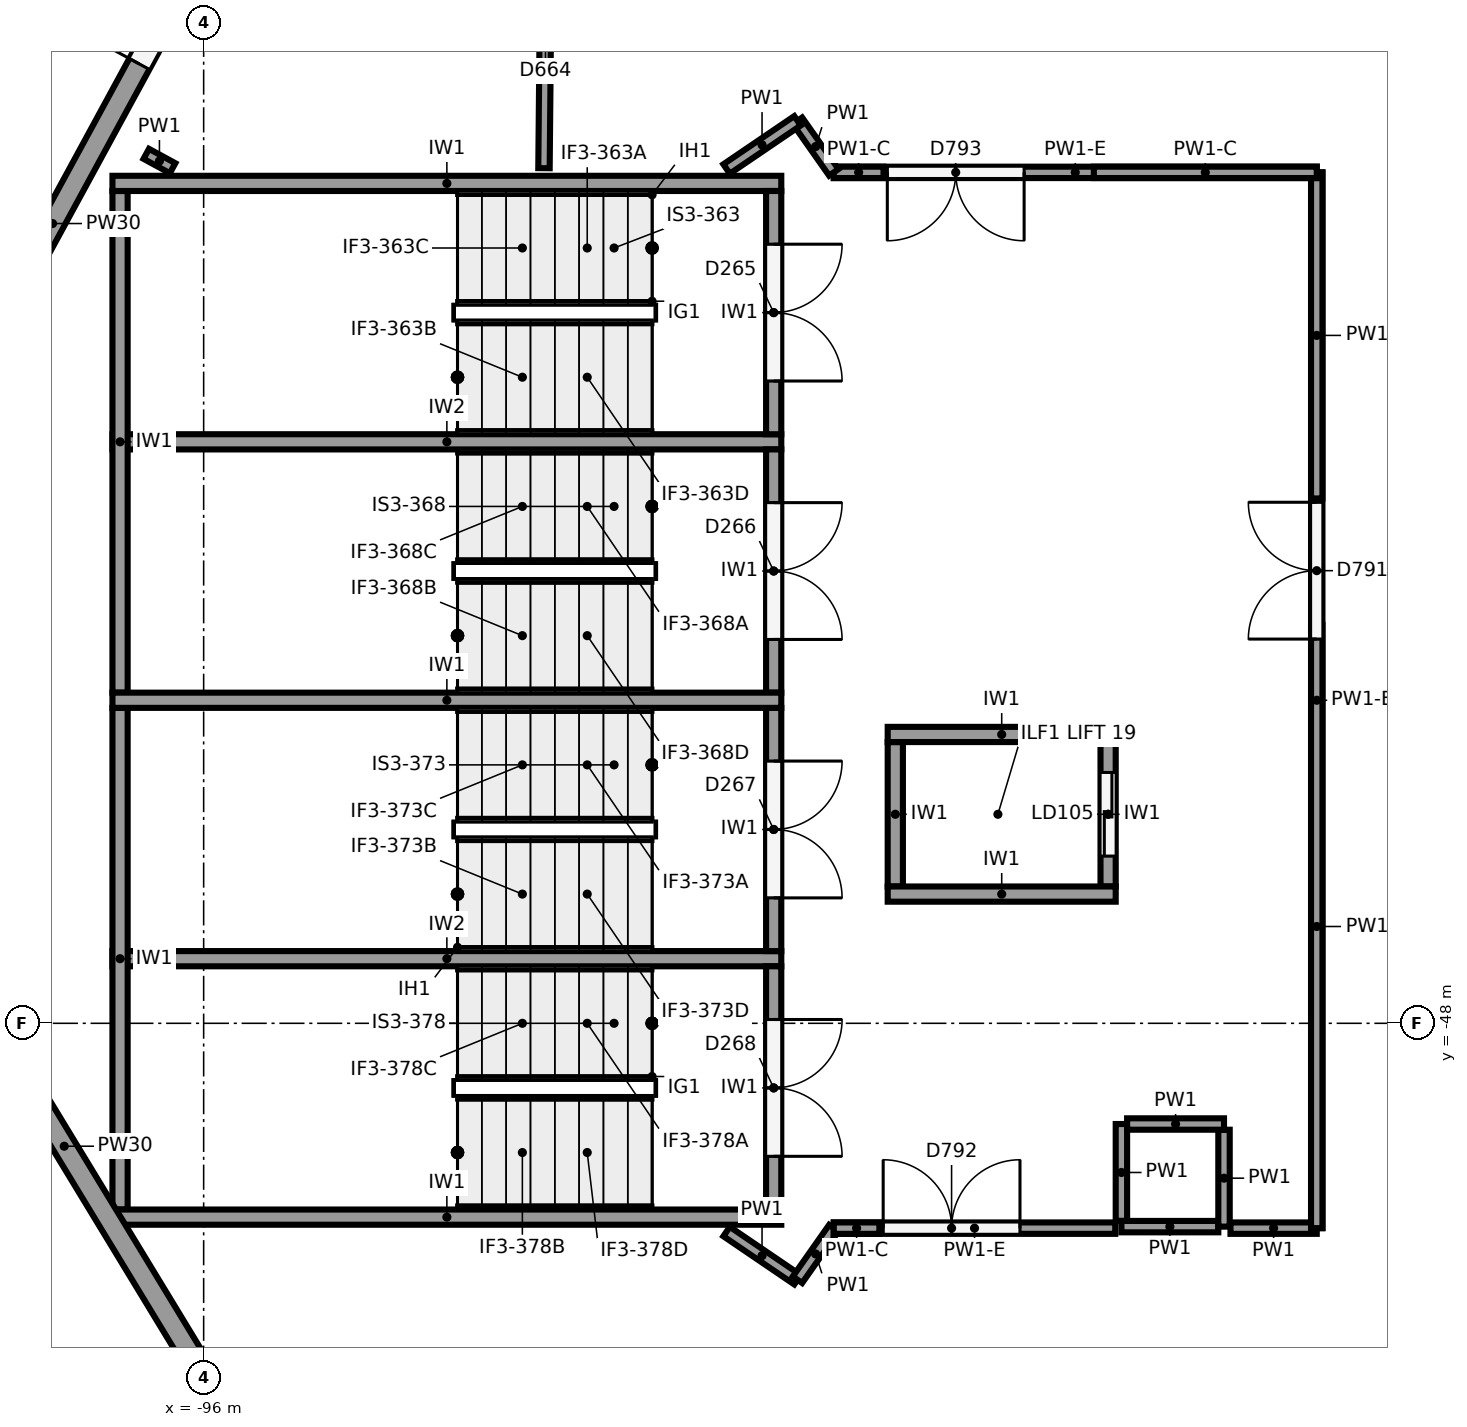
"""IFC4 building model, lengths in metres.
Left out: names, types, materials, properties, quantities, classifications, styles, units other than length and angle.
Written with IfcOpenShell. Run it as: python <this file> out.ifc"""

import sys

from ifc_helpers import new_model, si_unit, direction, frame, frame_2d, origin, origin_2d, place, context, subcontext, project, spatial, rectangle, circle, extrude, element, fill, save


model = new_model("IFC4")
c1 = context("Model", 3, precision=1e-05, world=origin(), true_north=direction((0.0, 1.0)))
c2 = subcontext(c1, "Body", "Model", "MODEL_VIEW")
j1 = project(units=[si_unit("LENGTHUNIT", "METRE"), si_unit("PLANEANGLEUNIT", "RADIAN")], contexts=[c1])
p1 = place(None, origin())
s1 = spatial("IfcSite", under=j1, at=p1, CompositionType="ELEMENT")
p2 = place(p1, origin())
s2 = spatial("IfcBuilding", under=s1, at=p2, CompositionType="ELEMENT")
p3 = place(p2, frame((0.0, 0.0, 6.5)))
s3 = spatial("IfcBuildingStorey", under=s2, at=p3, CompositionType="ELEMENT", Elevation=6.5)
p4 = place(p3, frame((-84.884, -42.562, 0.0), z_axis=(0.0, 0.0, 1.0), x_axis=(1.0, 0.0, 0.0)))
e1 = element("IfcColumn", 1, at=p4, inside=s3, PredefinedType="COLUMN", context=c2, shape_type="SweptSolid", body=[
    extrude(circle(Radius=0.6, at=origin_2d()), origin(), (0.0, 0.0, 1.0), 5.5),
])
p5 = place(p3, frame((-101.161, -43.311, 0.0), z_axis=(0.0, 0.0, 1.0), x_axis=(0.477867771117, 0.878431780691, 0.0)))
e2 = element("IfcWall", 2, at=p5, inside=s3, PredefinedType="SOLIDWALL", context=c2, shape_type="SweptSolid", body=[
    extrude(rectangle(XDim=13.28, YDim=0.3, at=frame_2d((6.64, 0.0))), origin(), (0.0, 0.0, 1.0), 3.85),
])
p6 = place(p5, frame((9.03, 0.0, 0.0)))
e3 = element("IfcOpeningElement", 3, at=p6, cuts=e2, PredefinedType="OPENING", context=c2, shape_type="SweptSolid", body=[
    extrude(rectangle(XDim=1.8, YDim=2.4, at=frame_2d((0.9, 1.2))), frame((0.0, 0.16, 0.0), z_axis=(0.0, -1.0, 0.0), x_axis=(1.0, 0.0, 0.0)), (0.0, 0.0, 1.0), 0.32),
])
p7 = place(p3, frame((-94.528, -55.057, 0.0), z_axis=(0.0, 0.0, 1.0), x_axis=(-0.519362860044, 0.854553813172, 0.0)))
e4 = element("IfcWall", 4, at=p7, inside=s3, PredefinedType="SOLIDWALL", context=c2, shape_type="SweptSolid", body=[
    extrude(rectangle(XDim=12.732, YDim=0.3, at=frame_2d((6.366, 0.0))), origin(), (0.0, 0.0, 1.0), 3.85),
])
for number, where, z_axis, x_axis in (
    (5, (-97.2, -36.95, 0.0), (0.0, 0.0, 1.0), (1.0, 0.0, 0.0)),
    (6, (-97.2, -43.75, 0.0), (0.0, 0.0, 1.0), (1.0, 0.0, 0.0)),
    (7, (-97.2, -50.55, 0.0), (0.0, 0.0, 1.0), (1.0, 0.0, 0.0)),
):
    element("IfcWall", number, at=place(p3, frame(where, z_axis=z_axis, x_axis=x_axis)), inside=s3, PredefinedType="SHEAR", context=c2, shape_type="SweptSolid", body=[
        extrude(rectangle(XDim=8.8, YDim=0.2, at=frame_2d((4.4, 0.0))), origin(), (0.0, 0.0, 1.0), 5.15),
    ])
for number, where, z_axis, x_axis in (
    (8, (-97.1, -37.05, 0.0), (0.0, 0.0, 1.0), (0.0, -1.0, 0.0)),
    (9, (-97.1, -43.85, 0.0), (0.0, 0.0, 1.0), (0.0, -1.0, 0.0)),
):
    element("IfcWall", number, at=place(p3, frame(where, z_axis=z_axis, x_axis=x_axis)), inside=s3, PredefinedType="SHEAR", context=c2, shape_type="SweptSolid", body=[
        extrude(rectangle(XDim=6.6, YDim=0.2, at=frame_2d((3.3, 0.0))), origin(), (0.0, 0.0, 1.0), 5.15),
    ])
for number, where, z_axis, x_axis in (
    (10, (-97.2, -40.35, 0.0), (0.0, 0.0, 1.0), (1.0, 0.0, 0.0)),
    (11, (-97.2, -47.15, 0.0), (0.0, 0.0, 1.0), (1.0, 0.0, 0.0)),
):
    element("IfcWall", number, at=place(p3, frame(where, z_axis=z_axis, x_axis=x_axis)), inside=s3, PredefinedType="SHEAR", context=c2, shape_type="SweptSolid", body=[
        extrude(rectangle(XDim=8.8, YDim=0.2, at=frame_2d((4.4, 0.0))), origin(), (0.0, 0.0, 1.0), 5.15),
    ])
p8 = place(p3, frame((-88.5, -37.05, 0.0), z_axis=(0.0, 0.0, 1.0), x_axis=(0.0, -1.0, 0.0)))
e12 = element("IfcWall", 12, at=p8, inside=s3, PredefinedType="SHEAR", context=c2, shape_type="SweptSolid", body=[
    extrude(rectangle(XDim=3.2, YDim=0.2, at=frame_2d((1.6, 0.0))), origin(), (0.0, 0.0, 1.0), 5.15),
])
p9 = place(p8, frame((0.7, 0.0, 0.0)))
e13 = element("IfcOpeningElement", 13, at=p9, cuts=e12, PredefinedType="OPENING", context=c2, shape_type="SweptSolid", body=[
    extrude(rectangle(XDim=1.8, YDim=2.1, at=frame_2d((0.9, 1.05))), frame((0.0, 0.11, 0.0), z_axis=(0.0, -1.0, 0.0), x_axis=(1.0, 0.0, 0.0)), (0.0, 0.0, 1.0), 0.22),
])
p10 = place(p3, frame((-88.5, -40.45, 0.0), z_axis=(0.0, 0.0, 1.0), x_axis=(0.0, -1.0, 0.0)))
e14 = element("IfcWall", 14, at=p10, inside=s3, PredefinedType="SHEAR", context=c2, shape_type="SweptSolid", body=[
    extrude(rectangle(XDim=3.2, YDim=0.2, at=frame_2d((1.6, 0.0))), origin(), (0.0, 0.0, 1.0), 5.15),
])
p11 = place(p10, frame((0.7, 0.0, 0.0)))
e15 = element("IfcOpeningElement", 15, at=p11, cuts=e14, PredefinedType="OPENING", context=c2, shape_type="SweptSolid", body=[
    extrude(rectangle(XDim=1.8, YDim=2.1, at=frame_2d((0.9, 1.05))), frame((0.0, 0.11, 0.0), z_axis=(0.0, -1.0, 0.0), x_axis=(1.0, 0.0, 0.0)), (0.0, 0.0, 1.0), 0.22),
])
p12 = place(p3, frame((-88.5, -43.85, 0.0), z_axis=(0.0, 0.0, 1.0), x_axis=(0.0, -1.0, 0.0)))
e16 = element("IfcWall", 16, at=p12, inside=s3, PredefinedType="SHEAR", context=c2, shape_type="SweptSolid", body=[
    extrude(rectangle(XDim=3.2, YDim=0.2, at=frame_2d((1.6, 0.0))), origin(), (0.0, 0.0, 1.0), 5.15),
])
p13 = place(p12, frame((0.7, 0.0, 0.0)))
e17 = element("IfcOpeningElement", 17, at=p13, cuts=e16, PredefinedType="OPENING", context=c2, shape_type="SweptSolid", body=[
    extrude(rectangle(XDim=1.8, YDim=2.1, at=frame_2d((0.9, 1.05))), frame((0.0, 0.11, 0.0), z_axis=(0.0, -1.0, 0.0), x_axis=(1.0, 0.0, 0.0)), (0.0, 0.0, 1.0), 0.22),
])
p14 = place(p3, frame((-88.5, -47.25, 0.0), z_axis=(0.0, 0.0, 1.0), x_axis=(0.0, -1.0, 0.0)))
e18 = element("IfcWall", 18, at=p14, inside=s3, PredefinedType="SHEAR", context=c2, shape_type="SweptSolid", body=[
    extrude(rectangle(XDim=3.2, YDim=0.2, at=frame_2d((1.6, 0.0))), origin(), (0.0, 0.0, 1.0), 5.15),
])
p15 = place(p14, frame((0.7, 0.0, 0.0)))
e19 = element("IfcOpeningElement", 19, at=p15, cuts=e18, PredefinedType="OPENING", context=c2, shape_type="SweptSolid", body=[
    extrude(rectangle(XDim=1.8, YDim=2.1, at=frame_2d((0.9, 1.05))), frame((0.0, 0.11, 0.0), z_axis=(0.0, -1.0, 0.0), x_axis=(1.0, 0.0, 0.0)), (0.0, 0.0, 1.0), 0.22),
])
for number, where, z_axis, x_axis in (
    (20, (-87.0, -44.2, 0.0), (0.0, 0.0, 1.0), (1.0, 0.0, 0.0)),
    (21, (-87.0, -46.3, 0.0), (0.0, 0.0, 1.0), (1.0, 0.0, 0.0)),
):
    element("IfcWall", number, at=place(p3, frame(where, z_axis=z_axis, x_axis=x_axis)), inside=s3, PredefinedType="SHEAR", context=c2, shape_type="SweptSolid", body=[
        extrude(rectangle(XDim=3.0, YDim=0.2, at=frame_2d((1.5, 0.0))), origin(), (0.0, 0.0, 1.0), 5.15),
    ])
p16 = place(p3, frame((-86.9, -44.3, 0.0), z_axis=(0.0, 0.0, 1.0), x_axis=(0.0, -1.0, 0.0)))
e22 = element("IfcWall", 22, at=p16, inside=s3, PredefinedType="SHEAR", context=c2, shape_type="SweptSolid", body=[
    extrude(rectangle(XDim=1.9, YDim=0.2, at=frame_2d((0.95, 0.0))), origin(), (0.0, 0.0, 1.0), 5.15),
])
p17 = place(p3, frame((-84.1, -44.3, 0.0), z_axis=(0.0, 0.0, 1.0), x_axis=(0.0, -1.0, 0.0)))
e23 = element("IfcWall", 23, at=p17, inside=s3, PredefinedType="SHEAR", context=c2, shape_type="SweptSolid", body=[
    extrude(rectangle(XDim=1.9, YDim=0.2, at=frame_2d((0.95, 0.0))), origin(), (0.0, 0.0, 1.0), 5.15),
])
p18 = place(p17, frame((0.4, 0.0, 0.0)))
e24 = element("IfcOpeningElement", 24, at=p18, cuts=e23, PredefinedType="OPENING", context=c2, shape_type="SweptSolid", body=[
    extrude(rectangle(XDim=1.1, YDim=2.1, at=frame_2d((0.55, 1.05))), frame((0.0, 0.11, 0.0), z_axis=(0.0, -1.0, 0.0), x_axis=(1.0, 0.0, 0.0)), (0.0, 0.0, 1.0), 0.22),
])
p19 = place(p3, frame((-96.408, -36.75, 0.0), z_axis=(0.0, 0.0, 1.0), x_axis=(-0.878438378965, 0.477855641759, 0.0)))
e25 = element("IfcWall", 25, at=p19, inside=s3, PredefinedType="PARTITIONING", context=c2, shape_type="SweptSolid", body=[
    extrude(rectangle(XDim=0.395, YDim=0.15, at=frame_2d((0.198, 0.0))), origin(), (0.0, 0.0, 1.0), 5.15),
])
p20 = place(p3, frame((-91.482, -32.47, 0.0), z_axis=(0.0, 0.0, 1.0), x_axis=(-0.009411482079, -0.999955711022, 0.0)))
e26 = element("IfcWall", 26, at=p20, inside=s3, PredefinedType="PARTITIONING", context=c2, shape_type="SweptSolid", body=[
    extrude(rectangle(XDim=4.28, YDim=0.15, at=frame_2d((2.14, 0.0))), origin(), (0.0, 0.0, 1.0), 5.15),
])
p21 = place(p20, frame((1.7, 0.0, 0.0)))
e27 = element("IfcOpeningElement", 27, at=p21, cuts=e26, PredefinedType="OPENING", context=c2, shape_type="SweptSolid", body=[
    extrude(rectangle(XDim=1.0, YDim=2.1, at=frame_2d((0.5, 1.05))), frame((0.0, 0.085, 0.0), z_axis=(0.0, -1.0, 0.0), x_axis=(1.0, 0.0, 0.0)), (0.0, 0.0, 1.0), 0.17),
])
for number, where, z_axis, x_axis in (
    (28, (-83.925, -49.325, 0.0), (0.0, 0.0, 1.0), (0.0, -1.0, 0.0)),
    (29, (-83.925, -50.675, 0.0), (0.0, 0.0, 1.0), (1.0, 0.0, 0.0)),
    (30, (-82.575, -50.675, 0.0), (0.0, 0.0, 1.0), (0.0, 1.0, 0.0)),
    (31, (-82.575, -49.325, 0.0), (0.0, 0.0, 1.0), (-1.0, 0.0, 0.0)),
):
    element("IfcWall", number, at=place(p3, frame(where, z_axis=z_axis, x_axis=x_axis)), inside=s3, PredefinedType="PARTITIONING", context=c2, shape_type="SweptSolid", body=[
        extrude(rectangle(XDim=1.275, YDim=0.15, at=frame_2d((0.638, 0.0))), origin(), (0.0, 0.0, 1.0), 5.15),
    ])
p22 = place(p3, frame((-89.12, -50.74, 0.0), z_axis=(0.0, 0.0, 1.0), x_axis=(0.827055308354, -0.562120553728, 0.0)))
e32 = element("IfcWall", 32, at=p22, inside=s3, PredefinedType="PARTITIONING", context=c2, shape_type="SweptSolid", body=[
    extrude(rectangle(XDim=1.128, YDim=0.15, at=frame_2d((0.564, 0.0))), origin(), (0.0, 0.0, 1.0), 5.15),
])
p23 = place(p3, frame((-88.187, -51.374, 0.0), z_axis=(0.0, 0.0, 1.0), x_axis=(0.575376756214, 0.817888493872, 0.0)))
e33 = element("IfcWall", 33, at=p23, inside=s3, PredefinedType="PARTITIONING", context=c2, shape_type="SweptSolid", body=[
    extrude(rectangle(XDim=0.83, YDim=0.15, at=frame_2d((0.415, 0.0))), origin(), (0.0, 0.0, 1.0), 5.15),
])
p24 = place(p3, frame((-87.709, -50.695, 0.0), z_axis=(0.0, 0.0, 1.0), x_axis=(1.0, 0.0, 0.0)))
e34 = element("IfcWall", 34, at=p24, inside=s3, PredefinedType="PARTITIONING", context=c2, shape_type="SweptSolid", body=[
    extrude(rectangle(XDim=3.704, YDim=0.15, at=frame_2d((1.852, 0.0))), origin(), (0.0, 0.0, 1.0), 4.05),
])
p25 = place(p24, frame((0.65, 0.0, 0.0)))
e35 = element("IfcOpeningElement", 35, at=p25, cuts=e34, PredefinedType="OPENING", context=c2, shape_type="SweptSolid", body=[
    extrude(rectangle(XDim=1.8, YDim=2.1, at=frame_2d((0.9, 1.05))), frame((0.0, 0.085, 0.0), z_axis=(0.0, -1.0, 0.0), x_axis=(1.0, 0.0, 0.0)), (0.0, 0.0, 1.0), 0.17),
])
p26 = place(p3, frame((-87.709, -50.695, 4.05), z_axis=(0.0, 0.0, 1.0), x_axis=(1.0, 0.0, 0.0)))
e36 = element("IfcWall", 36, at=p26, inside=s3, PredefinedType="PARTITIONING", context=c2, shape_type="SweptSolid", body=[
    extrude(rectangle(XDim=0.6, YDim=0.15, at=frame_2d((0.3, 0.0))), origin(), (0.0, 0.0, 1.0), 1.1),
])
p27 = place(p3, frame((-82.49, -50.695, 0.0), z_axis=(0.0, 0.0, 1.0), x_axis=(1.0, 0.0, 0.0)))
e37 = element("IfcWall", 37, at=p27, inside=s3, PredefinedType="PARTITIONING", context=c2, shape_type="SweptSolid", body=[
    extrude(rectangle(XDim=1.135, YDim=0.15, at=frame_2d((0.567, 0.0))), origin(), (0.0, 0.0, 1.0), 5.15),
])
p28 = place(p3, frame((-81.355, -50.695, 0.0), z_axis=(0.0, 0.0, 1.0), x_axis=(0.0, 1.0, 0.0)))
e38 = element("IfcWall", 38, at=p28, inside=s3, PredefinedType="PARTITIONING", context=c2, shape_type="SweptSolid", body=[
    extrude(rectangle(XDim=13.89, YDim=0.15, at=frame_2d((6.945, 0.0))), origin(), (0.0, 0.0, 1.0), 4.05),
])
p29 = place(p28, frame((7.75, 0.0, 0.0)))
e39 = element("IfcOpeningElement", 39, at=p29, cuts=e38, PredefinedType="OPENING", context=c2, shape_type="SweptSolid", body=[
    extrude(rectangle(XDim=1.8, YDim=2.1, at=frame_2d((0.9, 1.05))), frame((0.0, 0.085, 0.0), z_axis=(0.0, -1.0, 0.0), x_axis=(1.0, 0.0, 0.0)), (0.0, 0.0, 1.0), 0.17),
])
p30 = place(p3, frame((-81.355, -50.695, 4.05), z_axis=(0.0, 0.0, 1.0), x_axis=(0.0, 1.0, 0.0)))
e40 = element("IfcWall", 40, at=p30, inside=s3, PredefinedType="PARTITIONING", context=c2, shape_type="SweptSolid", body=[
    extrude(rectangle(XDim=7.937, YDim=0.15, at=frame_2d((3.969, 0.0))), origin(), (0.0, 0.0, 1.0), 1.1),
])
p31 = place(p3, frame((-81.355, -41.095, 4.05), z_axis=(0.0, 0.0, 1.0), x_axis=(0.0, 1.0, 0.0)))
e41 = element("IfcWall", 41, at=p31, inside=s3, PredefinedType="PARTITIONING", context=c2, shape_type="SweptSolid", body=[
    extrude(rectangle(XDim=4.29, YDim=0.15, at=frame_2d((2.145, 0.0))), origin(), (0.0, 0.0, 1.0), 1.1),
])
p32 = place(p3, frame((-81.355, -36.805, 0.0), z_axis=(0.0, 0.0, 1.0), x_axis=(-1.0, 0.0, 0.0)))
e42 = element("IfcWall", 42, at=p32, inside=s3, PredefinedType="PARTITIONING", context=c2, shape_type="SweptSolid", body=[
    extrude(rectangle(XDim=6.354, YDim=0.15, at=frame_2d((3.177, 0.0))), origin(), (0.0, 0.0, 1.0), 4.05),
])
p33 = place(p32, frame((3.85, 0.0, 0.0)))
e43 = element("IfcOpeningElement", 43, at=p33, cuts=e42, PredefinedType="OPENING", context=c2, shape_type="SweptSolid", body=[
    extrude(rectangle(XDim=1.8, YDim=2.1, at=frame_2d((0.9, 1.05))), frame((0.0, 0.085, 0.0), z_axis=(0.0, -1.0, 0.0), x_axis=(1.0, 0.0, 0.0)), (0.0, 0.0, 1.0), 0.17),
])
p34 = place(p3, frame((-81.355, -36.805, 4.05), z_axis=(0.0, 0.0, 1.0), x_axis=(-1.0, 0.0, 0.0)))
e44 = element("IfcWall", 44, at=p34, inside=s3, PredefinedType="PARTITIONING", context=c2, shape_type="SweptSolid", body=[
    extrude(rectangle(XDim=2.933, YDim=0.15, at=frame_2d((1.466, 0.0))), origin(), (0.0, 0.0, 1.0), 1.1),
])
p35 = place(p3, frame((-87.055, -36.805, 4.05), z_axis=(0.0, 0.0, 1.0), x_axis=(-1.0, 0.0, 0.0)))
e45 = element("IfcWall", 45, at=p35, inside=s3, PredefinedType="PARTITIONING", context=c2, shape_type="SweptSolid", body=[
    extrude(rectangle(XDim=0.654, YDim=0.15, at=frame_2d((0.327, 0.0))), origin(), (0.0, 0.0, 1.0), 1.1),
])
p36 = place(p3, frame((-87.709, -36.805, 0.0), z_axis=(0.0, 0.0, 1.0), x_axis=(-0.575573582652, 0.81774999294, 0.0)))
e46 = element("IfcWall", 46, at=p36, inside=s3, PredefinedType="PARTITIONING", context=c2, shape_type="SweptSolid", body=[
    extrude(rectangle(XDim=0.83, YDim=0.15, at=frame_2d((0.415, 0.0))), origin(), (0.0, 0.0, 1.0), 5.15),
])
p37 = place(p3, frame((-88.187, -36.126, 0.0), z_axis=(0.0, 0.0, 1.0), x_axis=(-0.827055308354, -0.562120553728, 0.0)))
e47 = element("IfcWall", 47, at=p37, inside=s3, PredefinedType="PARTITIONING", context=c2, shape_type="SweptSolid", body=[
    extrude(rectangle(XDim=1.128, YDim=0.15, at=frame_2d((0.564, 0.0))), origin(), (0.0, 0.0, 1.0), 5.15),
])
p38 = place(p6, origin())
e48 = element("IfcDoor", 48, at=p38, inside=s3, OperationType="DOUBLE_DOOR_SINGLE_SWING", PredefinedType="DOOR", context=c2, shape_type="SweptSolid", body=[
    extrude(rectangle(XDim=1.8, YDim=2.4, at=frame_2d((0.9, 1.2))), frame((0.0, 0.025, 0.0), z_axis=(0.0, -1.0, 0.0), x_axis=(1.0, 0.0, 0.0)), (0.0, 0.0, 1.0), 0.05),
])
fill(e3, e48)
p39 = place(p9, origin())
e49 = element("IfcDoor", 49, at=p39, inside=s3, OperationType="DOUBLE_DOOR_SINGLE_SWING", PredefinedType="DOOR", context=c2, shape_type="SweptSolid", body=[
    extrude(rectangle(XDim=1.8, YDim=2.1, at=frame_2d((0.9, 1.05))), frame((0.0, 0.025, 0.0), z_axis=(0.0, -1.0, 0.0), x_axis=(1.0, 0.0, 0.0)), (0.0, 0.0, 1.0), 0.05),
])
fill(e13, e49)
p40 = place(p11, origin())
e50 = element("IfcDoor", 50, at=p40, inside=s3, OperationType="DOUBLE_DOOR_SINGLE_SWING", PredefinedType="DOOR", context=c2, shape_type="SweptSolid", body=[
    extrude(rectangle(XDim=1.8, YDim=2.1, at=frame_2d((0.9, 1.05))), frame((0.0, 0.025, 0.0), z_axis=(0.0, -1.0, 0.0), x_axis=(1.0, 0.0, 0.0)), (0.0, 0.0, 1.0), 0.05),
])
fill(e15, e50)
p41 = place(p13, origin())
e51 = element("IfcDoor", 51, at=p41, inside=s3, OperationType="DOUBLE_DOOR_SINGLE_SWING", PredefinedType="DOOR", context=c2, shape_type="SweptSolid", body=[
    extrude(rectangle(XDim=1.8, YDim=2.1, at=frame_2d((0.9, 1.05))), frame((0.0, 0.025, 0.0), z_axis=(0.0, -1.0, 0.0), x_axis=(1.0, 0.0, 0.0)), (0.0, 0.0, 1.0), 0.05),
])
fill(e17, e51)
p42 = place(p15, origin())
e52 = element("IfcDoor", 52, at=p42, inside=s3, OperationType="DOUBLE_DOOR_SINGLE_SWING", PredefinedType="DOOR", context=c2, shape_type="SweptSolid", body=[
    extrude(rectangle(XDim=1.8, YDim=2.1, at=frame_2d((0.9, 1.05))), frame((0.0, 0.025, 0.0), z_axis=(0.0, -1.0, 0.0), x_axis=(1.0, 0.0, 0.0)), (0.0, 0.0, 1.0), 0.05),
])
fill(e19, e52)
p43 = place(p18, origin())
e53 = element("IfcDoor", 53, at=p43, inside=s3, OperationType="SLIDING_TO_LEFT", PredefinedType="DOOR", context=c2, shape_type="SweptSolid", body=[
    extrude(rectangle(XDim=1.1, YDim=2.1, at=frame_2d((0.55, 1.05))), frame((0.0, 0.025, 0.0), z_axis=(0.0, -1.0, 0.0), x_axis=(1.0, 0.0, 0.0)), (0.0, 0.0, 1.0), 0.05),
])
fill(e24, e53)
p44 = place(p29, origin())
e54 = element("IfcDoor", 54, at=p44, inside=s3, OperationType="DOUBLE_DOOR_SINGLE_SWING", PredefinedType="DOOR", context=c2, shape_type="SweptSolid", body=[
    extrude(rectangle(XDim=1.8, YDim=2.1, at=frame_2d((0.9, 1.05))), frame((0.0, 0.025, 0.0), z_axis=(0.0, -1.0, 0.0), x_axis=(1.0, 0.0, 0.0)), (0.0, 0.0, 1.0), 0.05),
])
fill(e39, e54)
p45 = place(p25, origin())
e55 = element("IfcDoor", 55, at=p45, inside=s3, OperationType="DOUBLE_DOOR_SINGLE_SWING", PredefinedType="DOOR", context=c2, shape_type="SweptSolid", body=[
    extrude(rectangle(XDim=1.8, YDim=2.1, at=frame_2d((0.9, 1.05))), frame((0.0, 0.025, 0.0), z_axis=(0.0, -1.0, 0.0), x_axis=(1.0, 0.0, 0.0)), (0.0, 0.0, 1.0), 0.05),
])
fill(e35, e55)
p46 = place(p33, origin())
e56 = element("IfcDoor", 56, at=p46, inside=s3, OperationType="DOUBLE_DOOR_SINGLE_SWING", PredefinedType="DOOR", context=c2, shape_type="SweptSolid", body=[
    extrude(rectangle(XDim=1.8, YDim=2.1, at=frame_2d((0.9, 1.05))), frame((0.0, 0.025, 0.0), z_axis=(0.0, -1.0, 0.0), x_axis=(1.0, 0.0, 0.0)), (0.0, 0.0, 1.0), 0.05),
])
fill(e43, e56)
save(model, sys.argv[1])
